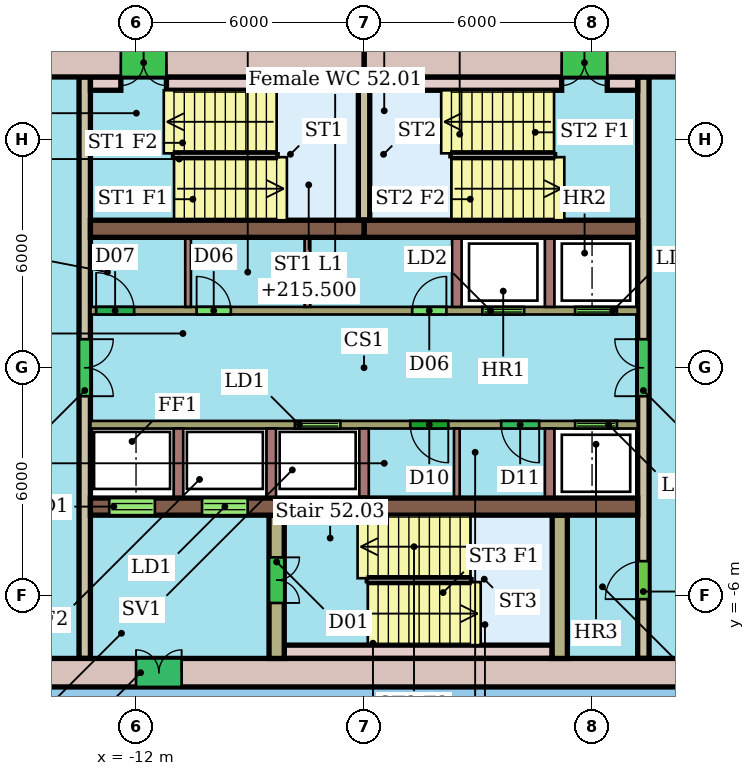
"""IFC4 building model, lengths in metres.
Left out: names, types, materials, properties, quantities, classifications, styles, units other than length and angle.
Written with IfcOpenShell. Run it as: python <this file> out.ifc"""

import sys

from ifc_helpers import new_model, si_unit, direction, frame, frame_2d, origin, place, context, subcontext, project, spatial, rectangle, extrude, element, fill, save


model = new_model("IFC4")
c1 = context("Model", 3, precision=1e-05, world=origin(), true_north=direction((0.0, 1.0)))
c2 = subcontext(c1, "Body", "Model", "MODEL_VIEW")
j1 = project(units=[si_unit("LENGTHUNIT", "METRE"), si_unit("PLANEANGLEUNIT", "RADIAN")], contexts=[c1])
p1 = place(None, origin())
s1 = spatial("IfcSite", under=j1, at=p1, CompositionType="ELEMENT")
p2 = place(p1, origin())
s2 = spatial("IfcBuilding", under=s1, at=p2, CompositionType="ELEMENT")
p3 = place(p2, frame((0.0, 0.0, 213.7)))
s3 = spatial("IfcBuildingStorey", under=s2, at=p3, CompositionType="ELEMENT", Elevation=213.7)
p4 = place(p3, frame((4.8, 8.025, 0.0), z_axis=(0.0, 0.0, 1.0), x_axis=(-1.0, 0.0, 0.0)))
e1 = element("IfcWall", 1, at=p4, inside=s3, PredefinedType="SHEAR", context=c2, shape_type="SweptSolid", body=[
    extrude(rectangle(XDim=10.8, YDim=0.75, at=frame_2d((5.4, 0.0))), origin(), (0.0, 0.0, 1.0), 3.3),
])
p5 = place(p4, frame((4.4, 0.0, 0.0)))
e2 = element("IfcOpeningElement", 2, at=p5, cuts=e1, PredefinedType="OPENING", context=c2, shape_type="SweptSolid", body=[
    extrude(rectangle(XDim=1.2, YDim=2.1, at=frame_2d((0.6, 1.05))), frame((0.0, 0.385, 0.0), z_axis=(0.0, -1.0, 0.0), x_axis=(1.0, 0.0, 0.0)), (0.0, 0.0, 1.0), 0.77),
])
p6 = place(p3, frame((-6.0, 8.025, 0.0), z_axis=(0.0, 0.0, 1.0), x_axis=(-1.0, 0.0, 0.0)))
e3 = element("IfcWall", 3, at=p6, inside=s3, PredefinedType="SHEAR", context=c2, shape_type="SweptSolid", body=[
    extrude(rectangle(XDim=10.8, YDim=0.75, at=frame_2d((5.4, 0.0))), origin(), (0.0, 0.0, 1.0), 3.3),
])
p7 = place(p6, frame((5.2, 0.0, 0.0)))
e4 = element("IfcOpeningElement", 4, at=p7, cuts=e3, PredefinedType="OPENING", context=c2, shape_type="SweptSolid", body=[
    extrude(rectangle(XDim=1.2, YDim=2.1, at=frame_2d((0.6, 1.05))), frame((0.0, 0.385, 0.0), z_axis=(0.0, -1.0, 0.0), x_axis=(1.0, 0.0, 0.0)), (0.0, 0.0, 1.0), 0.77),
])
p8 = place(p3, frame((-16.8, -8.025, 0.0), z_axis=(0.0, 0.0, 1.0), x_axis=(1.0, 0.0, 0.0)))
e5 = element("IfcWall", 5, at=p8, inside=s3, PredefinedType="SHEAR", context=c2, shape_type="SweptSolid", body=[
    extrude(rectangle(XDim=21.6, YDim=0.75, at=frame_2d((10.8, 0.0))), origin(), (0.0, 0.0, 1.0), 3.3),
])
p9 = place(p8, frame((4.8, 0.0, 0.0)))
e6 = element("IfcOpeningElement", 6, at=p9, cuts=e5, PredefinedType="OPENING", context=c2, shape_type="SweptSolid", body=[
    extrude(rectangle(XDim=1.2, YDim=2.1, at=frame_2d((0.6, 1.05))), frame((0.0, 0.385, 0.0), z_axis=(0.0, -1.0, 0.0), x_axis=(1.0, 0.0, 0.0)), (0.0, 0.0, 1.0), 0.77),
])
for number, where, z_axis, x_axis in (
    (7, (-13.2, 3.655, 0.0), (0.0, 0.0, 1.0), (1.0, 0.0, 0.0)),
    (8, (-6.0, 3.655, 0.0), (0.0, 0.0, 1.0), (1.0, 0.0, 0.0)),
):
    element("IfcWall", number, at=place(p3, frame(where, z_axis=z_axis, x_axis=x_axis)), inside=s3, PredefinedType="SHEAR", context=c2, shape_type="SweptSolid", body=[
        extrude(rectangle(XDim=7.2, YDim=0.45, at=frame_2d((3.6, 0.0))), origin(), (0.0, 0.0, 1.0), 3.3),
    ])
p10 = place(p3, frame((-13.2, -3.655, 0.0), z_axis=(0.0, 0.0, 1.0), x_axis=(1.0, 0.0, 0.0)))
e9 = element("IfcWall", 9, at=p10, inside=s3, PredefinedType="SHEAR", context=c2, shape_type="SweptSolid", body=[
    extrude(rectangle(XDim=7.2, YDim=0.45, at=frame_2d((3.6, 0.0))), origin(), (0.0, 0.0, 1.0), 3.3),
])
p11 = place(p10, frame((0.496, 0.0, 0.0)))
e10 = element("IfcOpeningElement", 10, at=p11, cuts=e9, PredefinedType="OPENING", context=c2, shape_type="SweptSolid", body=[
    extrude(rectangle(XDim=1.2, YDim=2.1, at=frame_2d((0.6, 1.05))), frame((0.0, 0.235, 0.0), z_axis=(0.0, -1.0, 0.0), x_axis=(1.0, 0.0, 0.0)), (0.0, 0.0, 1.0), 0.47),
])
p12 = place(p10, frame((2.938, 0.0, 0.0)))
e11 = element("IfcOpeningElement", 11, at=p12, cuts=e9, PredefinedType="OPENING", context=c2, shape_type="SweptSolid", body=[
    extrude(rectangle(XDim=1.2, YDim=2.1, at=frame_2d((0.6, 1.05))), frame((0.0, 0.235, 0.0), z_axis=(0.0, -1.0, 0.0), x_axis=(1.0, 0.0, 0.0)), (0.0, 0.0, 1.0), 0.47),
])
p13 = place(p3, frame((-6.0, -3.655, 0.0), z_axis=(0.0, 0.0, 1.0), x_axis=(1.0, 0.0, 0.0)))
e12 = element("IfcWall", 12, at=p13, inside=s3, PredefinedType="SHEAR", context=c2, shape_type="SweptSolid", body=[
    extrude(rectangle(XDim=7.2, YDim=0.45, at=frame_2d((3.6, 0.0))), origin(), (0.0, 0.0, 1.0), 3.3),
])
p14 = place(p3, frame((-13.35, 7.65, 0.0), z_axis=(0.0, 0.0, 1.0), x_axis=(0.0, -1.0, 0.0)))
e13 = element("IfcWall", 13, at=p14, inside=s3, PredefinedType="SHEAR", context=c2, shape_type="SweptSolid", body=[
    extrude(rectangle(XDim=15.3, YDim=0.3, at=frame_2d((7.65, 0.0))), origin(), (0.0, 0.0, 1.0), 3.3),
])
p15 = place(p14, frame((6.9, 0.0, 0.0)))
e14 = element("IfcOpeningElement", 14, at=p15, cuts=e13, PredefinedType="OPENING", context=c2, shape_type="SweptSolid", body=[
    extrude(rectangle(XDim=1.5, YDim=2.1, at=frame_2d((0.75, 1.05))), frame((0.0, 0.16, 0.0), z_axis=(0.0, -1.0, 0.0), x_axis=(1.0, 0.0, 0.0)), (0.0, 0.0, 1.0), 0.32),
])
p16 = place(p3, frame((1.35, -7.65, 0.0), z_axis=(0.0, 0.0, 1.0), x_axis=(0.0, 1.0, 0.0)))
e15 = element("IfcWall", 15, at=p16, inside=s3, PredefinedType="SHEAR", context=c2, shape_type="SweptSolid", body=[
    extrude(rectangle(XDim=15.3, YDim=0.3, at=frame_2d((7.65, 0.0))), origin(), (0.0, 0.0, 1.0), 3.3),
])
p17 = place(p16, frame((1.56, 0.0, 0.0)))
e16 = element("IfcOpeningElement", 16, at=p17, cuts=e15, PredefinedType="OPENING", context=c2, shape_type="SweptSolid", body=[
    extrude(rectangle(XDim=1.0, YDim=2.1, at=frame_2d((0.5, 1.05))), frame((0.0, 0.16, 0.0), z_axis=(0.0, -1.0, 0.0), x_axis=(1.0, 0.0, 0.0)), (0.0, 0.0, 1.0), 0.32),
])
p18 = place(p16, frame((6.9, 0.0, 0.0)))
e17 = element("IfcOpeningElement", 17, at=p18, cuts=e15, PredefinedType="OPENING", context=c2, shape_type="SweptSolid", body=[
    extrude(rectangle(XDim=1.5, YDim=2.1, at=frame_2d((0.75, 1.05))), frame((0.0, 0.16, 0.0), z_axis=(0.0, -1.0, 0.0), x_axis=(1.0, 0.0, 0.0)), (0.0, 0.0, 1.0), 0.32),
])
p19 = place(p3, frame((-13.2, 1.5, 0.0), z_axis=(0.0, 0.0, 1.0), x_axis=(1.0, 0.0, 0.0)))
e18 = element("IfcWall", 18, at=p19, inside=s3, PredefinedType="SHEAR", context=c2, shape_type="SweptSolid", body=[
    extrude(rectangle(XDim=14.4, YDim=0.2, at=frame_2d((7.2, 0.0))), origin(), (0.0, 0.0, 1.0), 3.3),
])
p20 = place(p19, frame((10.312, 0.0, 0.0)))
e19 = element("IfcOpeningElement", 19, at=p20, cuts=e18, PredefinedType="OPENING", context=c2, shape_type="SweptSolid", body=[
    extrude(rectangle(XDim=1.1, YDim=2.1, at=frame_2d((0.55, 1.05))), frame((0.0, 0.11, 0.0), z_axis=(0.0, -1.0, 0.0), x_axis=(1.0, 0.0, 0.0)), (0.0, 0.0, 1.0), 0.22),
])
p21 = place(p19, frame((12.754, 0.0, 0.0)))
e20 = element("IfcOpeningElement", 20, at=p21, cuts=e18, PredefinedType="OPENING", context=c2, shape_type="SweptSolid", body=[
    extrude(rectangle(XDim=1.1, YDim=2.1, at=frame_2d((0.55, 1.05))), frame((0.0, 0.11, 0.0), z_axis=(0.0, -1.0, 0.0), x_axis=(1.0, 0.0, 0.0)), (0.0, 0.0, 1.0), 0.22),
])
p22 = place(p19, frame((0.15, 0.0, 0.0)))
e21 = element("IfcOpeningElement", 21, at=p22, cuts=e18, PredefinedType="OPENING", context=c2, shape_type="SweptSolid", body=[
    extrude(rectangle(XDim=1.0, YDim=2.1, at=frame_2d((0.5, 1.05))), frame((0.0, 0.11, 0.0), z_axis=(0.0, -1.0, 0.0), x_axis=(1.0, 0.0, 0.0)), (0.0, 0.0, 1.0), 0.22),
])
p23 = place(p19, frame((2.794, 0.0, 0.0)))
e22 = element("IfcOpeningElement", 22, at=p23, cuts=e18, PredefinedType="OPENING", context=c2, shape_type="SweptSolid", body=[
    extrude(rectangle(XDim=0.9, YDim=2.1, at=frame_2d((0.45, 1.05))), frame((0.0, 0.11, 0.0), z_axis=(0.0, -1.0, 0.0), x_axis=(1.0, 0.0, 0.0)), (0.0, 0.0, 1.0), 0.22),
])
p24 = place(p19, frame((8.467, 0.0, 0.0)))
e23 = element("IfcOpeningElement", 23, at=p24, cuts=e18, PredefinedType="OPENING", context=c2, shape_type="SweptSolid", body=[
    extrude(rectangle(XDim=0.9, YDim=2.1, at=frame_2d((0.45, 1.05))), frame((0.0, 0.11, 0.0), z_axis=(0.0, -1.0, 0.0), x_axis=(1.0, 0.0, 0.0)), (0.0, 0.0, 1.0), 0.22),
])
p25 = place(p3, frame((1.2, -1.5, 0.0), z_axis=(0.0, 0.0, 1.0), x_axis=(-1.0, 0.0, 0.0)))
e24 = element("IfcWall", 24, at=p25, inside=s3, PredefinedType="SHEAR", context=c2, shape_type="SweptSolid", body=[
    extrude(rectangle(XDim=14.4, YDim=0.2, at=frame_2d((7.2, 0.0))), origin(), (0.0, 0.0, 1.0), 3.3),
])
p26 = place(p25, frame((7.821, 0.0, 0.0)))
e25 = element("IfcOpeningElement", 25, at=p26, cuts=e24, PredefinedType="OPENING", context=c2, shape_type="SweptSolid", body=[
    extrude(rectangle(XDim=1.2, YDim=2.1, at=frame_2d((0.6, 1.05))), frame((0.0, 0.11, 0.0), z_axis=(0.0, -1.0, 0.0), x_axis=(1.0, 0.0, 0.0)), (0.0, 0.0, 1.0), 0.22),
])
p27 = place(p25, frame((0.546, 0.0, 0.0)))
e26 = element("IfcOpeningElement", 26, at=p27, cuts=e24, PredefinedType="OPENING", context=c2, shape_type="SweptSolid", body=[
    extrude(rectangle(XDim=1.1, YDim=2.1, at=frame_2d((0.55, 1.05))), frame((0.0, 0.11, 0.0), z_axis=(0.0, -1.0, 0.0), x_axis=(1.0, 0.0, 0.0)), (0.0, 0.0, 1.0), 0.22),
])
p28 = place(p25, frame((4.983, 0.0, 0.0)))
e27 = element("IfcOpeningElement", 27, at=p28, cuts=e24, PredefinedType="OPENING", context=c2, shape_type="SweptSolid", body=[
    extrude(rectangle(XDim=1.0, YDim=2.1, at=frame_2d((0.5, 1.05))), frame((0.0, 0.11, 0.0), z_axis=(0.0, -1.0, 0.0), x_axis=(1.0, 0.0, 0.0)), (0.0, 0.0, 1.0), 0.22),
])
p29 = place(p25, frame((2.592, 0.0, 0.0)))
e28 = element("IfcOpeningElement", 28, at=p29, cuts=e24, PredefinedType="OPENING", context=c2, shape_type="SweptSolid", body=[
    extrude(rectangle(XDim=1.0, YDim=2.1, at=frame_2d((0.5, 1.05))), frame((0.0, 0.11, 0.0), z_axis=(0.0, -1.0, 0.0), x_axis=(1.0, 0.0, 0.0)), (0.0, 0.0, 1.0), 0.22),
])
p30 = place(p3, frame((-8.3, -3.88, 0.0), z_axis=(0.0, 0.0, 1.0), x_axis=(0.0, -1.0, 0.0)))
e29 = element("IfcWall", 29, at=p30, inside=s3, PredefinedType="SHEAR", context=c2, shape_type="SweptSolid", body=[
    extrude(rectangle(XDim=3.77, YDim=0.4, at=frame_2d((1.885, 0.0))), origin(), (0.0, 0.0, 1.0), 3.3),
])
p31 = place(p30, frame((1.11, 0.0, 0.0)))
e30 = element("IfcOpeningElement", 30, at=p31, cuts=e29, PredefinedType="OPENING", context=c2, shape_type="SweptSolid", body=[
    extrude(rectangle(XDim=1.2, YDim=2.1, at=frame_2d((0.6, 1.05))), frame((0.0, 0.21, 0.0), z_axis=(0.0, -1.0, 0.0), x_axis=(1.0, 0.0, 0.0)), (0.0, 0.0, 1.0), 0.42),
])
p32 = place(p3, frame((-0.85, -3.88, 0.0), z_axis=(0.0, 0.0, 1.0), x_axis=(0.0, -1.0, 0.0)))
e31 = element("IfcWall", 31, at=p32, inside=s3, PredefinedType="SHEAR", context=c2, shape_type="SweptSolid", body=[
    extrude(rectangle(XDim=3.77, YDim=0.4, at=frame_2d((1.885, 0.0))), origin(), (0.0, 0.0, 1.0), 3.3),
])
p33 = place(p3, frame((-6.0, 3.88, 0.0), z_axis=(0.0, 0.0, 1.0), x_axis=(0.0, 1.0, 0.0)))
e32 = element("IfcWall", 32, at=p33, inside=s3, PredefinedType="SHEAR", context=c2, shape_type="SweptSolid", body=[
    extrude(rectangle(XDim=3.77, YDim=0.3, at=frame_2d((1.885, 0.0))), origin(), (0.0, 0.0, 1.0), 3.3),
])
p34 = place(p3, frame((-13.2, 7.475, 0.0), z_axis=(0.0, 0.0, 1.0), x_axis=(1.0, 0.0, 0.0)))
e33 = element("IfcWall", 33, at=p34, inside=s3, PredefinedType="SHEAR", context=c2, shape_type="SweptSolid", body=[
    extrude(rectangle(XDim=0.8, YDim=0.35, at=frame_2d((0.4, 0.0))), origin(), (0.0, 0.0, 1.0), 3.3),
])
for number, where, z_axis, x_axis in (
    (34, (-11.2, 7.475, 0.0), (0.0, 0.0, 1.0), (1.0, 0.0, 0.0)),
    (35, (-5.85, 7.475, 0.0), (0.0, 0.0, 1.0), (1.0, 0.0, 0.0)),
):
    element("IfcWall", number, at=place(p3, frame(where, z_axis=z_axis, x_axis=x_axis)), inside=s3, PredefinedType="SHEAR", context=c2, shape_type="SweptSolid", body=[
        extrude(rectangle(XDim=5.05, YDim=0.35, at=frame_2d((2.525, 0.0))), origin(), (0.0, 0.0, 1.0), 3.3),
    ])
p35 = place(p3, frame((0.4, 7.475, 0.0), z_axis=(0.0, 0.0, 1.0), x_axis=(1.0, 0.0, 0.0)))
e36 = element("IfcWall", 36, at=p35, inside=s3, PredefinedType="SHEAR", context=c2, shape_type="SweptSolid", body=[
    extrude(rectangle(XDim=0.8, YDim=0.35, at=frame_2d((0.4, 0.0))), origin(), (0.0, 0.0, 1.0), 3.3),
])
p36 = place(p3, frame((-8.1, -7.475, 0.0), z_axis=(0.0, 0.0, 1.0), x_axis=(1.0, 0.0, 0.0)))
e37 = element("IfcWall", 37, at=p36, inside=s3, PredefinedType="SHEAR", context=c2, shape_type="SweptSolid", body=[
    extrude(rectangle(XDim=7.05, YDim=0.35, at=frame_2d((3.525, 0.0))), origin(), (0.0, 0.0, 1.0), 3.3),
])
for number, where, z_axis, x_axis in (
    (38, (-3.558, 1.6, 0.0), (0.0, 0.0, 1.0), (0.0, 1.0, 0.0)),
    (39, (-1.117, 1.6, 0.0), (0.0, 0.0, 1.0), (0.0, 1.0, 0.0)),
):
    element("IfcWall", number, at=place(p3, frame(where, z_axis=z_axis, x_axis=x_axis)), inside=s3, PredefinedType="SHEAR", context=c2, shape_type="SweptSolid", body=[
        extrude(rectangle(XDim=1.83, YDim=0.25, at=frame_2d((0.915, 0.0))), origin(), (0.0, 0.0, 1.0), 3.3),
    ])
for number, where, z_axis, x_axis in (
    (40, (-10.631, 1.6, 0.0), (0.0, 0.0, 1.0), (0.0, 1.0, 0.0)),
    (41, (-7.49, 1.6, 0.0), (0.0, 0.0, 1.0), (0.0, 1.0, 0.0)),
):
    element("IfcWall", number, at=place(p3, frame(where, z_axis=z_axis, x_axis=x_axis)), inside=s3, PredefinedType="PARTITIONING", context=c2, shape_type="SweptSolid", body=[
        extrude(rectangle(XDim=1.83, YDim=0.15, at=frame_2d((0.915, 0.0))), origin(), (0.0, 0.0, 1.0), 3.3),
    ])
for number, where, z_axis, x_axis in (
    (42, (-10.883, -1.6, 0.0), (0.0, 0.0, 1.0), (0.0, -1.0, 0.0)),
    (43, (-8.442, -1.6, 0.0), (0.0, 0.0, 1.0), (0.0, -1.0, 0.0)),
    (44, (-6.0, -1.6, 0.0), (0.0, 0.0, 1.0), (0.0, -1.0, 0.0)),
    (45, (-1.117, -1.6, 0.0), (0.0, 0.0, 1.0), (0.0, -1.0, 0.0)),
):
    element("IfcWall", number, at=place(p3, frame(where, z_axis=z_axis, x_axis=x_axis)), inside=s3, PredefinedType="SHEAR", context=c2, shape_type="SweptSolid", body=[
        extrude(rectangle(XDim=1.83, YDim=0.25, at=frame_2d((0.915, 0.0))), origin(), (0.0, 0.0, 1.0), 3.3),
    ])
p37 = place(p3, frame((-3.558, -1.6, 0.0), z_axis=(0.0, 0.0, 1.0), x_axis=(0.0, -1.0, 0.0)))
e46 = element("IfcWall", 46, at=p37, inside=s3, PredefinedType="PARTITIONING", context=c2, shape_type="SweptSolid", body=[
    extrude(rectangle(XDim=1.83, YDim=0.15, at=frame_2d((0.915, 0.0))), origin(), (0.0, 0.0, 1.0), 3.3),
])
p38 = place(p5, origin())
e47 = element("IfcDoor", 47, at=p38, inside=s3, OperationType="DOUBLE_DOOR_SINGLE_SWING", PredefinedType="NOTDEFINED", context=c2, shape_type="SweptSolid", body=[
    extrude(rectangle(XDim=1.2, YDim=2.1, at=frame_2d((0.6, 1.05))), frame((0.0, 0.025, 0.0), z_axis=(0.0, -1.0, 0.0), x_axis=(1.0, 0.0, 0.0)), (0.0, 0.0, 1.0), 0.05),
])
fill(e2, e47)
p39 = place(p7, origin())
e48 = element("IfcDoor", 48, at=p39, inside=s3, OperationType="DOUBLE_DOOR_SINGLE_SWING", PredefinedType="NOTDEFINED", context=c2, shape_type="SweptSolid", body=[
    extrude(rectangle(XDim=1.2, YDim=2.1, at=frame_2d((0.6, 1.05))), frame((0.0, 0.025, 0.0), z_axis=(0.0, -1.0, 0.0), x_axis=(1.0, 0.0, 0.0)), (0.0, 0.0, 1.0), 0.05),
])
fill(e4, e48)
p40 = place(p9, origin())
e49 = element("IfcDoor", 49, at=p40, inside=s3, OperationType="DOUBLE_DOOR_SINGLE_SWING", PredefinedType="NOTDEFINED", context=c2, shape_type="SweptSolid", body=[
    extrude(rectangle(XDim=1.2, YDim=2.1, at=frame_2d((0.6, 1.05))), frame((0.0, 0.025, 0.0), z_axis=(0.0, -1.0, 0.0), x_axis=(1.0, 0.0, 0.0)), (0.0, 0.0, 1.0), 0.05),
])
fill(e6, e49)
p41 = place(p11, origin())
e50 = element("IfcDoor", 50, at=p41, inside=s3, OperationType="DOUBLE_DOOR_SLIDING", PredefinedType="NOTDEFINED", context=c2, shape_type="SweptSolid", body=[
    extrude(rectangle(XDim=1.2, YDim=2.1, at=frame_2d((0.6, 1.05))), frame((0.0, 0.025, 0.0), z_axis=(0.0, -1.0, 0.0), x_axis=(1.0, 0.0, 0.0)), (0.0, 0.0, 1.0), 0.05),
])
fill(e10, e50)
p42 = place(p12, origin())
e51 = element("IfcDoor", 51, at=p42, inside=s3, OperationType="DOUBLE_DOOR_SLIDING", PredefinedType="NOTDEFINED", context=c2, shape_type="SweptSolid", body=[
    extrude(rectangle(XDim=1.2, YDim=2.1, at=frame_2d((0.6, 1.05))), frame((0.0, 0.025, 0.0), z_axis=(0.0, -1.0, 0.0), x_axis=(1.0, 0.0, 0.0)), (0.0, 0.0, 1.0), 0.05),
])
fill(e11, e51)
p43 = place(p15, origin())
e52 = element("IfcDoor", 52, at=p43, inside=s3, OperationType="DOUBLE_DOOR_SINGLE_SWING", PredefinedType="NOTDEFINED", context=c2, shape_type="SweptSolid", body=[
    extrude(rectangle(XDim=1.5, YDim=2.1, at=frame_2d((0.75, 1.05))), frame((0.0, 0.025, 0.0), z_axis=(0.0, -1.0, 0.0), x_axis=(1.0, 0.0, 0.0)), (0.0, 0.0, 1.0), 0.05),
])
fill(e14, e52)
p44 = place(p17, origin())
e53 = element("IfcDoor", 53, at=p44, inside=s3, OperationType="SINGLE_SWING_LEFT", PredefinedType="NOTDEFINED", context=c2, shape_type="SweptSolid", body=[
    extrude(rectangle(XDim=1.0, YDim=2.1, at=frame_2d((0.5, 1.05))), frame((0.0, 0.025, 0.0), z_axis=(0.0, -1.0, 0.0), x_axis=(1.0, 0.0, 0.0)), (0.0, 0.0, 1.0), 0.05),
])
fill(e16, e53)
p45 = place(p18, origin())
e54 = element("IfcDoor", 54, at=p45, inside=s3, OperationType="DOUBLE_DOOR_SINGLE_SWING", PredefinedType="NOTDEFINED", context=c2, shape_type="SweptSolid", body=[
    extrude(rectangle(XDim=1.5, YDim=2.1, at=frame_2d((0.75, 1.05))), frame((0.0, 0.025, 0.0), z_axis=(0.0, -1.0, 0.0), x_axis=(1.0, 0.0, 0.0)), (0.0, 0.0, 1.0), 0.05),
])
fill(e17, e54)
p46 = place(p20, origin())
e55 = element("IfcDoor", 55, at=p46, inside=s3, OperationType="DOUBLE_DOOR_SLIDING", PredefinedType="NOTDEFINED", context=c2, shape_type="SweptSolid", body=[
    extrude(rectangle(XDim=1.1, YDim=2.1, at=frame_2d((0.55, 1.05))), frame((0.0, 0.025, 0.0), z_axis=(0.0, -1.0, 0.0), x_axis=(1.0, 0.0, 0.0)), (0.0, 0.0, 1.0), 0.05),
])
fill(e19, e55)
p47 = place(p21, origin())
e56 = element("IfcDoor", 56, at=p47, inside=s3, OperationType="DOUBLE_DOOR_SLIDING", PredefinedType="NOTDEFINED", context=c2, shape_type="SweptSolid", body=[
    extrude(rectangle(XDim=1.1, YDim=2.1, at=frame_2d((0.55, 1.05))), frame((0.0, 0.025, 0.0), z_axis=(0.0, -1.0, 0.0), x_axis=(1.0, 0.0, 0.0)), (0.0, 0.0, 1.0), 0.05),
])
fill(e20, e56)
p48 = place(p22, origin())
e57 = element("IfcDoor", 57, at=p48, inside=s3, OperationType="SINGLE_SWING_LEFT", PredefinedType="NOTDEFINED", context=c2, shape_type="SweptSolid", body=[
    extrude(rectangle(XDim=1.0, YDim=2.1, at=frame_2d((0.5, 1.05))), frame((0.0, 0.025, 0.0), z_axis=(0.0, -1.0, 0.0), x_axis=(1.0, 0.0, 0.0)), (0.0, 0.0, 1.0), 0.05),
])
fill(e21, e57)
p49 = place(p23, origin())
e58 = element("IfcDoor", 58, at=p49, inside=s3, OperationType="SINGLE_SWING_LEFT", PredefinedType="NOTDEFINED", context=c2, shape_type="SweptSolid", body=[
    extrude(rectangle(XDim=0.9, YDim=2.1, at=frame_2d((0.45, 1.05))), frame((0.0, 0.025, 0.0), z_axis=(0.0, -1.0, 0.0), x_axis=(1.0, 0.0, 0.0)), (0.0, 0.0, 1.0), 0.05),
])
fill(e22, e58)
p50 = place(p24, origin())
e59 = element("IfcDoor", 59, at=p50, inside=s3, OperationType="SINGLE_SWING_RIGHT", PredefinedType="NOTDEFINED", context=c2, shape_type="SweptSolid", body=[
    extrude(rectangle(XDim=0.9, YDim=2.1, at=frame_2d((0.45, 1.05))), frame((0.0, 0.025, 0.0), z_axis=(0.0, -1.0, 0.0), x_axis=(1.0, 0.0, 0.0)), (0.0, 0.0, 1.0), 0.05),
])
fill(e23, e59)
p51 = place(p26, origin())
e60 = element("IfcDoor", 60, at=p51, inside=s3, OperationType="DOUBLE_DOOR_SLIDING", PredefinedType="NOTDEFINED", context=c2, shape_type="SweptSolid", body=[
    extrude(rectangle(XDim=1.2, YDim=2.1, at=frame_2d((0.6, 1.05))), frame((0.0, 0.025, 0.0), z_axis=(0.0, -1.0, 0.0), x_axis=(1.0, 0.0, 0.0)), (0.0, 0.0, 1.0), 0.05),
])
fill(e25, e60)
p52 = place(p27, origin())
e61 = element("IfcDoor", 61, at=p52, inside=s3, OperationType="DOUBLE_DOOR_SLIDING", PredefinedType="NOTDEFINED", context=c2, shape_type="SweptSolid", body=[
    extrude(rectangle(XDim=1.1, YDim=2.1, at=frame_2d((0.55, 1.05))), frame((0.0, 0.025, 0.0), z_axis=(0.0, -1.0, 0.0), x_axis=(1.0, 0.0, 0.0)), (0.0, 0.0, 1.0), 0.05),
])
fill(e26, e61)
p53 = place(p28, origin())
e62 = element("IfcDoor", 62, at=p53, inside=s3, OperationType="SINGLE_SWING_LEFT", PredefinedType="NOTDEFINED", context=c2, shape_type="SweptSolid", body=[
    extrude(rectangle(XDim=1.0, YDim=2.1, at=frame_2d((0.5, 1.05))), frame((0.0, 0.025, 0.0), z_axis=(0.0, -1.0, 0.0), x_axis=(1.0, 0.0, 0.0)), (0.0, 0.0, 1.0), 0.05),
])
fill(e27, e62)
p54 = place(p29, origin())
e63 = element("IfcDoor", 63, at=p54, inside=s3, OperationType="SINGLE_SWING_LEFT", PredefinedType="NOTDEFINED", context=c2, shape_type="SweptSolid", body=[
    extrude(rectangle(XDim=1.0, YDim=2.1, at=frame_2d((0.5, 1.05))), frame((0.0, 0.025, 0.0), z_axis=(0.0, -1.0, 0.0), x_axis=(1.0, 0.0, 0.0)), (0.0, 0.0, 1.0), 0.05),
])
fill(e28, e63)
p55 = place(p31, origin())
e64 = element("IfcDoor", 64, at=p55, inside=s3, OperationType="DOUBLE_DOOR_SINGLE_SWING", PredefinedType="NOTDEFINED", context=c2, shape_type="SweptSolid", body=[
    extrude(rectangle(XDim=1.2, YDim=2.1, at=frame_2d((0.6, 1.05))), frame((0.0, 0.025, 0.0), z_axis=(0.0, -1.0, 0.0), x_axis=(1.0, 0.0, 0.0)), (0.0, 0.0, 1.0), 0.05),
])
fill(e30, e64)
save(model, sys.argv[1])
